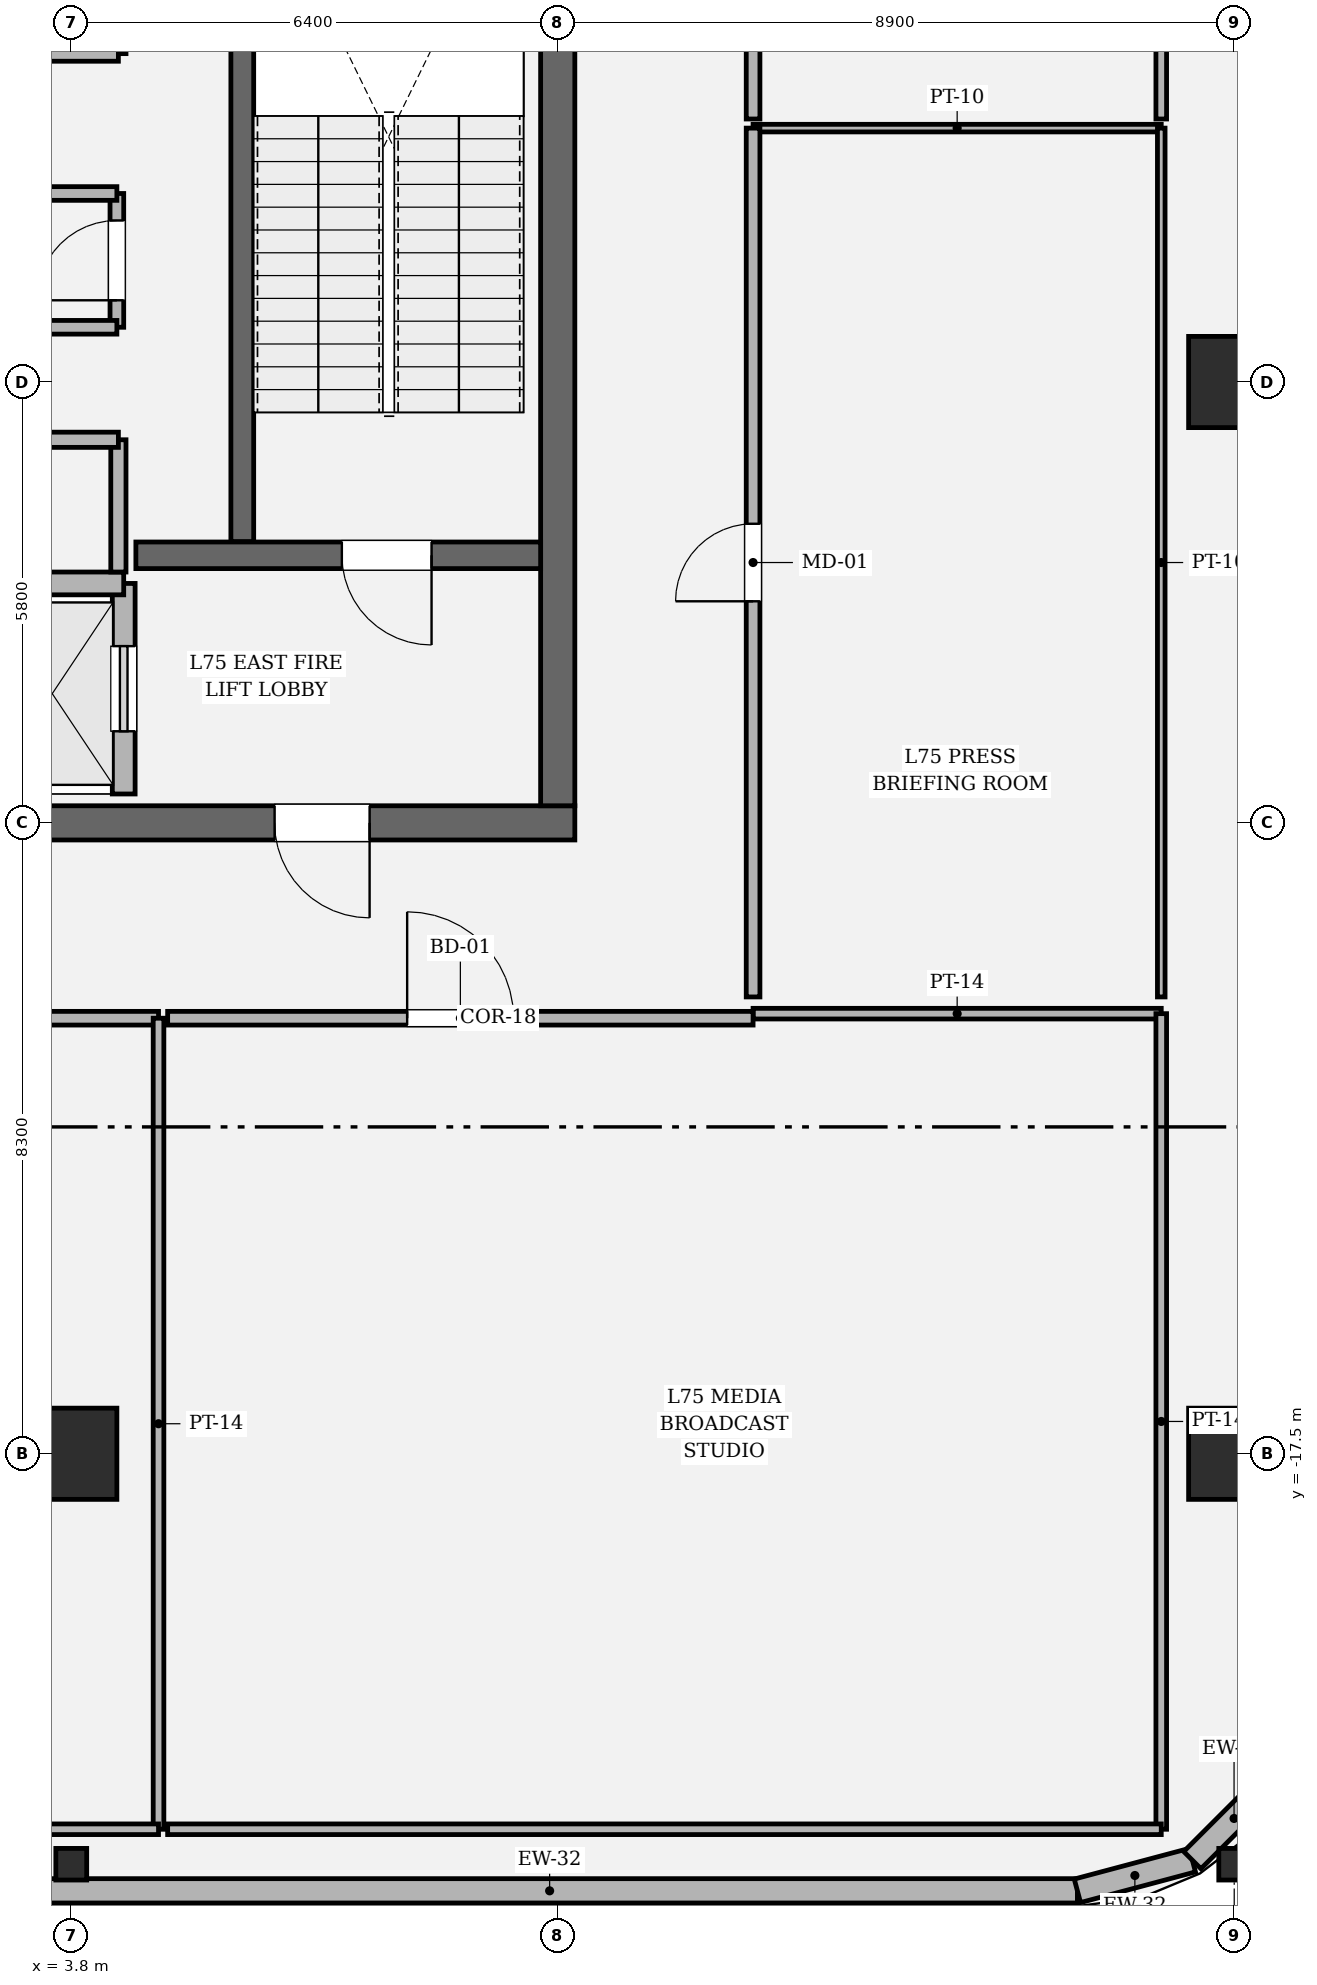
"""IFC4 building model, lengths in metres.
Left out: names, types, materials, properties, quantities, classifications, styles, units other than length and angle.
Written with IfcOpenShell. Run it as: python <this file> out.ifc"""

import sys

from ifc_helpers import new_model, si_unit, direction, frame, frame_2d, origin, origin_2d, place, context, subcontext, project, spatial, rectangle, hollow_rectangle, i_section, extrude, element, fill, save


model = new_model("IFC4")
c1 = context("Model", 3, precision=1e-05, world=origin(), true_north=direction((0.0, 1.0)))
c2 = subcontext(c1, "Body", "Model", "MODEL_VIEW")
j1 = project(units=[si_unit("LENGTHUNIT", "METRE"), si_unit("PLANEANGLEUNIT", "RADIAN")], contexts=[c1])
p1 = place(None, origin())
s1 = spatial("IfcSite", under=j1, at=p1, CompositionType="ELEMENT")
p2 = place(p1, origin())
s2 = spatial("IfcBuilding", under=s1, at=p2, CompositionType="ELEMENT")
p3 = place(p2, frame((0.0, 0.0, 317.4)))
s3 = spatial("IfcBuildingStorey", under=s2, at=p3, CompositionType="ELEMENT", Elevation=317.4)
p4 = place(p3, frame((10.425, -9.2, 0.0), z_axis=(0.0, 0.0, 1.0), x_axis=(-1.0, 0.0, 0.0)))
e1 = element("IfcWall", 1, at=p4, inside=s3, PredefinedType="SHEAR", context=c2, shape_type="SweptSolid", body=[
    extrude(rectangle(XDim=20.85, YDim=0.45, at=frame_2d((10.425, 0.0))), origin(), (0.0, 0.0, 1.0), 4.2),
])
p5 = place(p4, frame((2.7, 0.0, 0.0)))
e2 = element("IfcOpeningElement", 2, at=p5, cuts=e1, PredefinedType="OPENING", context=c2, shape_type="SweptSolid", body=[
    extrude(rectangle(XDim=1.25, YDim=2.25, at=frame_2d((0.625, 1.125))), frame((0.0, 0.235, 0.0), z_axis=(0.0, -1.0, 0.0), x_axis=(1.0, 0.0, 0.0)), (0.0, 0.0, 1.0), 0.47),
])
p6 = place(p4, frame((16.9, 0.0, 0.0)))
e3 = element("IfcOpeningElement", 3, at=p6, cuts=e1, PredefinedType="OPENING", context=c2, shape_type="SweptSolid", body=[
    extrude(rectangle(XDim=1.25, YDim=2.25, at=frame_2d((0.625, 1.125))), frame((0.0, 0.235, 0.0), z_axis=(0.0, -1.0, 0.0), x_axis=(1.0, 0.0, 0.0)), (0.0, 0.0, 1.0), 0.47),
])
p7 = place(p3, frame((10.2, 8.975, 0.0), z_axis=(0.0, 0.0, 1.0), x_axis=(0.0, -1.0, 0.0)))
e4 = element("IfcWall", 4, at=p7, inside=s3, PredefinedType="SHEAR", context=c2, shape_type="SweptSolid", body=[
    extrude(rectangle(XDim=17.95, YDim=0.45, at=frame_2d((8.975, 0.0))), origin(), (0.0, 0.0, 1.0), 4.2),
])
p8 = place(p7, frame((4.005, 0.0, 0.0)))
e5 = element("IfcOpeningElement", 5, at=p8, cuts=e4, PredefinedType="OPENING", context=c2, shape_type="SweptSolid", body=[
    extrude(rectangle(XDim=1.18, YDim=2.2, at=frame_2d((0.59, 1.1))), frame((0.0, 0.235, 0.0), z_axis=(0.0, -1.0, 0.0), x_axis=(1.0, 0.0, 0.0)), (0.0, 0.0, 1.0), 0.47),
])
p9 = place(p3, frame((6.05, 3.45, 0.0), z_axis=(0.0, 0.0, 1.0), x_axis=(0.0, -1.0, 0.0)))
e6 = element("IfcWall", 6, at=p9, inside=s3, PredefinedType="SOLIDWALL", context=c2, shape_type="SweptSolid", body=[
    extrude(rectangle(XDim=8.95, YDim=0.3, at=frame_2d((4.475, 0.0))), origin(), (0.0, 0.0, 1.0), 4.2),
])
p10 = place(p3, frame((4.65, -5.68, 0.0), z_axis=(0.0, 0.0, 1.0), x_axis=(1.0, 0.0, 0.0)))
e7 = element("IfcWall", 7, at=p10, inside=s3, PredefinedType="SOLIDWALL", context=c2, shape_type="SweptSolid", body=[
    extrude(rectangle(XDim=5.325, YDim=0.35, at=frame_2d((2.663, 0.0))), origin(), (0.0, 0.0, 1.0), 4.2),
])
p11 = place(p10, frame((2.71, 0.0, 0.0)))
e8 = element("IfcOpeningElement", 8, at=p11, cuts=e7, PredefinedType="OPENING", context=c2, shape_type="SweptSolid", body=[
    extrude(rectangle(XDim=1.18, YDim=2.2, at=frame_2d((0.59, 1.1))), frame((0.0, 0.185, 0.0), z_axis=(0.0, -1.0, 0.0), x_axis=(1.0, 0.0, 0.0)), (0.0, 0.0, 1.0), 0.37),
])
for number, where, z_axis, x_axis in (
    (9, (3.8, -17.5, 0.0), (0.0, 0.0, 1.0), (1.0, 0.0, 0.0)),
    (10, (19.1, -17.5, 0.0), (0.0, 0.0, 1.0), (1.0, 0.0, 0.0)),
    (11, (19.1, -3.4, 0.0), (0.0, 0.0, 1.0), (1.0, 0.0, 0.0)),
):
    element("IfcColumn", number, at=place(p3, frame(where, z_axis=z_axis, x_axis=x_axis)), inside=s3, PredefinedType="COLUMN", context=c2, shape_type="SweptSolid", body=[
        extrude(hollow_rectangle(XDim=1.2, YDim=1.2, WallThickness=0.035, at=origin_2d()), origin(), (0.0, 0.0, 1.0), 4.2),
    ])
for number, where, z_axis, x_axis in (
    (12, (3.8, -22.9, 0.0), (0.0, 0.0, 1.0), (1.0, 0.0, 0.0)),
    (13, (19.1, -22.9, 0.0), (0.0, 0.0, 1.0), (1.0, 0.0, 0.0)),
):
    element("IfcColumn", number, at=place(p3, frame(where, z_axis=z_axis, x_axis=x_axis)), inside=s3, PredefinedType="COLUMN", context=c2, shape_type="SweptSolid", body=[
        extrude(i_section(OverallWidth=0.406, OverallDepth=0.416, WebThickness=0.029, FlangeThickness=0.048, FilletRadius=0.018, at=origin_2d()), origin(), (0.0, 0.0, 1.0), 4.198),
    ])
p12 = place(p3, frame((3.15, -23.25, 0.0), z_axis=(0.0, 0.0, 1.0), x_axis=(1.0, 0.0, 0.0)))
e14 = element("IfcWall", 14, at=p12, inside=s3, PredefinedType="SOLIDWALL", context=c2, shape_type="SweptSolid", body=[
    extrude(rectangle(XDim=13.887, YDim=0.32, at=frame_2d((6.943, 0.0))), origin(), (0.0, 0.0, 1.0), 2.714),
])
p13 = place(p3, frame((17.037, -23.25, 0.0), z_axis=(0.0, 0.0, 1.0), x_axis=(0.966224582397, 0.257701486942, 0.0)))
e15 = element("IfcWall", 15, at=p13, inside=s3, PredefinedType="SOLIDWALL", context=c2, shape_type="SweptSolid", body=[
    extrude(rectangle(XDim=1.565, YDim=0.32, at=frame_2d((0.783, 0.0))), origin(), (0.0, 0.0, 1.0), 2.714),
])
p14 = place(p3, frame((18.549, -22.847, 0.0), z_axis=(0.0, 0.0, 1.0), x_axis=(0.707028130747, 0.707185422879, 0.0)))
e16 = element("IfcWall", 16, at=p14, inside=s3, PredefinedType="SOLIDWALL", context=c2, shape_type="SweptSolid", body=[
    extrude(rectangle(XDim=1.552, YDim=0.32, at=frame_2d((0.776, 0.0))), origin(), (0.0, 0.0, 1.0), 2.674),
])
p15 = place(p3, frame((4.49, -8.82, 0.0), z_axis=(0.0, 0.0, 1.0), x_axis=(0.0, 1.0, 0.0)))
e17 = element("IfcWall", 17, at=p15, inside=s3, PredefinedType="SOLIDWALL", context=c2, shape_type="SweptSolid", body=[
    extrude(rectangle(XDim=2.77, YDim=0.3, at=frame_2d((1.385, 0.0))), origin(), (0.0, 0.0, 1.0), 4.0),
])
p16 = place(p15, frame((0.825, 0.0, 0.0)))
e18 = element("IfcOpeningElement", 18, at=p16, cuts=e17, PredefinedType="OPENING", context=c2, shape_type="SweptSolid", body=[
    extrude(rectangle(XDim=1.12, YDim=2.25, at=frame_2d((0.56, 1.125))), frame((0.0, 0.16, 0.0), z_axis=(0.0, -1.0, 0.0), x_axis=(1.0, 0.0, 0.0)), (0.0, 0.0, 1.0), 0.32),
])
p17 = place(p3, frame((2.61, -6.05, 0.0), z_axis=(0.0, 0.0, 1.0), x_axis=(1.0, 0.0, 0.0)))
e19 = element("IfcWall", 19, at=p17, inside=s3, PredefinedType="SOLIDWALL", context=c2, shape_type="SweptSolid", body=[
    extrude(rectangle(XDim=1.88, YDim=0.3, at=frame_2d((0.94, 0.0))), origin(), (0.0, 0.0, 1.0), 4.0),
])
p18 = place(p3, frame((4.42, -5.9, 0.0), z_axis=(0.0, 0.0, 1.0), x_axis=(0.0, 1.0, 0.0)))
e20 = element("IfcWall", 20, at=p18, inside=s3, PredefinedType="SOLIDWALL", context=c2, shape_type="SweptSolid", body=[
    extrude(rectangle(XDim=1.74, YDim=0.2, at=frame_2d((0.87, 0.0))), origin(), (0.0, 0.0, 1.0), 4.0),
])
p19 = place(p3, frame((4.42, -4.16, 0.0), z_axis=(0.0, 0.0, 1.0), x_axis=(-1.0, 0.0, 0.0)))
e21 = element("IfcWall", 21, at=p19, inside=s3, PredefinedType="SOLIDWALL", context=c2, shape_type="SweptSolid", body=[
    extrude(rectangle(XDim=2.84, YDim=0.2, at=frame_2d((1.42, 0.0))), origin(), (0.0, 0.0, 1.0), 4.0),
])
p20 = place(p19, frame((0.945, 0.0, 0.0)))
e22 = element("IfcOpeningElement", 22, at=p20, cuts=e21, PredefinedType="OPENING", context=c2, shape_type="SweptSolid", body=[
    extrude(rectangle(XDim=0.95, YDim=2.15, at=frame_2d((0.475, 1.075))), frame((0.0, 0.11, 0.0), z_axis=(0.0, -1.0, 0.0), x_axis=(1.0, 0.0, 0.0)), (0.0, 0.0, 1.0), 0.22),
])
p21 = place(p3, frame((4.4, -2.68, 0.0), z_axis=(0.0, 0.0, 1.0), x_axis=(0.0, 1.0, 0.0)))
e23 = element("IfcWall", 23, at=p21, inside=s3, PredefinedType="PARTITIONING", context=c2, shape_type="SweptSolid", body=[
    extrude(rectangle(XDim=1.76, YDim=0.18, at=frame_2d((0.88, 0.0))), origin(), (0.0, 0.0, 1.0), 4.0),
])
p22 = place(p21, frame((0.355, 0.0, 0.0)))
e24 = element("IfcOpeningElement", 24, at=p22, cuts=e23, PredefinedType="OPENING", context=c2, shape_type="SweptSolid", body=[
    extrude(rectangle(XDim=1.05, YDim=2.2, at=frame_2d((0.525, 1.1))), frame((0.0, 0.1, 0.0), z_axis=(0.0, -1.0, 0.0), x_axis=(1.0, 0.0, 0.0)), (0.0, 0.0, 1.0), 0.2),
])
for number, where, z_axis, x_axis in (
    (25, (4.4, -0.92, 0.0), (0.0, 0.0, 1.0), (-1.0, 0.0, 0.0)),
    (26, (0.25, -2.68, 0.0), (0.0, 0.0, 1.0), (1.0, 0.0, 0.0)),
):
    element("IfcWall", number, at=place(p3, frame(where, z_axis=z_axis, x_axis=x_axis)), inside=s3, PredefinedType="PARTITIONING", context=c2, shape_type="SweptSolid", body=[
        extrude(rectangle(XDim=4.15, YDim=0.18, at=frame_2d((2.075, 0.0))), origin(), (0.0, 0.0, 1.0), 4.0),
    ])
p23 = place(p3, frame((4.42, 0.92, 0.0), z_axis=(0.0, 0.0, 1.0), x_axis=(0.0, 1.0, 0.0)))
e27 = element("IfcWall", 27, at=p23, inside=s3, PredefinedType="SOLIDWALL", context=c2, shape_type="SweptSolid", body=[
    extrude(rectangle(XDim=1.76, YDim=0.2, at=frame_2d((0.88, 0.0))), origin(), (0.0, 0.0, 1.0), 4.0),
])
p24 = place(p23, frame((0.355, 0.0, 0.0)))
e28 = element("IfcOpeningElement", 28, at=p24, cuts=e27, PredefinedType="OPENING", context=c2, shape_type="SweptSolid", body=[
    extrude(rectangle(XDim=1.05, YDim=2.2, at=frame_2d((0.525, 1.1))), frame((0.0, 0.11, 0.0), z_axis=(0.0, -1.0, 0.0), x_axis=(1.0, 0.0, 0.0)), (0.0, 0.0, 1.0), 0.22),
])
p25 = place(p3, frame((2.5, 0.92, 0.0), z_axis=(0.0, 0.0, 1.0), x_axis=(1.0, 0.0, 0.0)))
e29 = element("IfcWall", 29, at=p25, inside=s3, PredefinedType="SOLIDWALL", context=c2, shape_type="SweptSolid", body=[
    extrude(rectangle(XDim=1.92, YDim=0.2, at=frame_2d((0.96, 0.0))), origin(), (0.0, 0.0, 1.0), 4.0),
])
p26 = place(p3, frame((-12.77, -11.77, 0.0), z_axis=(0.0, 0.0, 1.0), x_axis=(1.0, 0.0, 0.0)))
e30 = element("IfcWall", 30, at=p26, inside=s3, PredefinedType="PARTITIONING", context=c2, shape_type="SweptSolid", body=[
    extrude(rectangle(XDim=17.718, YDim=0.18, at=frame_2d((8.859, 0.0))), origin(), (0.0, 0.0, 1.0), 3.394),
])
p27 = place(p26, frame((8.334, 0.0, 0.0)))
e31 = element("IfcOpeningElement", 31, at=p27, cuts=e30, PredefinedType="OPENING", context=c2, shape_type="SweptSolid", body=[
    extrude(rectangle(XDim=1.05, YDim=2.2, at=frame_2d((0.525, 1.1))), frame((0.0, 0.1, 0.0), z_axis=(0.0, -1.0, 0.0), x_axis=(1.0, 0.0, 0.0)), (0.0, 0.0, 1.0), 0.2),
])
p28 = place(p3, frame((4.948, -11.77, 0.0), z_axis=(0.0, 0.0, 1.0), x_axis=(0.0, -1.0, 0.0)))
e32 = element("IfcWall", 32, at=p28, inside=s3, PredefinedType="PARTITIONING", context=c2, shape_type="SweptSolid", body=[
    extrude(rectangle(XDim=10.67, YDim=0.14, at=frame_2d((5.335, 0.0))), origin(), (0.0, 0.0, 1.0), 3.394),
])
p29 = place(p3, frame((4.948, -22.44, 0.0), z_axis=(0.0, 0.0, 1.0), x_axis=(-1.0, 0.0, 0.0)))
e33 = element("IfcWall", 33, at=p29, inside=s3, PredefinedType="PARTITIONING", context=c2, shape_type="SweptSolid", body=[
    extrude(rectangle(XDim=28.696, YDim=0.14, at=frame_2d((14.348, 0.0))), origin(), (0.0, 0.0, 1.0), 2.674),
])
p30 = place(p3, frame((12.77, -11.71, 0.0), z_axis=(0.0, 0.0, 1.0), x_axis=(1.0, 0.0, 0.0)))
e34 = element("IfcWall", 34, at=p30, inside=s3, PredefinedType="PARTITIONING", context=c2, shape_type="SweptSolid", body=[
    extrude(rectangle(XDim=5.37, YDim=0.14, at=frame_2d((2.685, 0.0))), origin(), (0.0, 0.0, 1.0), 3.634),
])
p31 = place(p3, frame((18.14, -11.71, 0.0), z_axis=(0.0, 0.0, 1.0), x_axis=(0.0, -1.0, 0.0)))
e35 = element("IfcWall", 35, at=p31, inside=s3, PredefinedType="PARTITIONING", context=c2, shape_type="SweptSolid", body=[
    extrude(rectangle(XDim=10.73, YDim=0.14, at=frame_2d((5.365, 0.0))), origin(), (0.0, 0.0, 1.0), 3.394),
])
p32 = place(p3, frame((18.14, -22.44, 0.0), z_axis=(0.0, 0.0, 1.0), x_axis=(-1.0, 0.0, 0.0)))
e36 = element("IfcWall", 36, at=p32, inside=s3, PredefinedType="PARTITIONING", context=c2, shape_type="SweptSolid", body=[
    extrude(rectangle(XDim=13.072, YDim=0.14, at=frame_2d((6.536, 0.0))), origin(), (0.0, 0.0, 1.0), 4.0),
])
p33 = place(p3, frame((5.068, -11.77, 0.0), z_axis=(0.0, 0.0, 1.0), x_axis=(1.0, 0.0, 0.0)))
e37 = element("IfcWall", 37, at=p33, inside=s3, PredefinedType="PARTITIONING", context=c2, shape_type="SweptSolid", body=[
    extrude(rectangle(XDim=7.702, YDim=0.18, at=frame_2d((3.851, 0.0))), origin(), (0.0, 0.0, 1.0), 3.394),
])
p34 = place(p33, frame((3.151, 0.0, 0.0)))
e38 = element("IfcOpeningElement", 38, at=p34, cuts=e37, PredefinedType="OPENING", context=c2, shape_type="SweptSolid", body=[
    extrude(rectangle(XDim=1.4, YDim=2.25, at=frame_2d((0.7, 1.125))), frame((0.0, 0.1, 0.0), z_axis=(0.0, -1.0, 0.0), x_axis=(1.0, 0.0, 0.0)), (0.0, 0.0, 1.0), 0.2),
])
p35 = place(p3, frame((12.77, -0.06, 0.0), z_axis=(0.0, 0.0, 1.0), x_axis=(1.0, 0.0, 0.0)))
e39 = element("IfcWall", 39, at=p35, inside=s3, PredefinedType="PARTITIONING", context=c2, shape_type="SweptSolid", body=[
    extrude(rectangle(XDim=5.37, YDim=0.1, at=frame_2d((2.685, 0.0))), origin(), (0.0, 0.0, 1.0), 4.0),
])
p36 = place(p3, frame((18.14, -0.06, 0.0), z_axis=(0.0, 0.0, 1.0), x_axis=(0.0, -1.0, 0.0)))
e40 = element("IfcWall", 40, at=p36, inside=s3, PredefinedType="PARTITIONING", context=c2, shape_type="SweptSolid", body=[
    extrude(rectangle(XDim=11.43, YDim=0.1, at=frame_2d((5.715, 0.0))), origin(), (0.0, 0.0, 1.0), 3.394),
])
p37 = place(p3, frame((12.77, -11.49, 0.0), z_axis=(0.0, 0.0, 1.0), x_axis=(0.0, 1.0, 0.0)))
e41 = element("IfcWall", 41, at=p37, inside=s3, PredefinedType="PARTITIONING", context=c2, shape_type="SweptSolid", body=[
    extrude(rectangle(XDim=11.43, YDim=0.18, at=frame_2d((5.715, 0.0))), origin(), (0.0, 0.0, 1.0), 3.394),
])
p38 = place(p37, frame((5.205, 0.0, 0.0)))
e42 = element("IfcOpeningElement", 42, at=p38, cuts=e41, PredefinedType="OPENING", context=c2, shape_type="SweptSolid", body=[
    extrude(rectangle(XDim=1.02, YDim=2.2, at=frame_2d((0.51, 1.1))), frame((0.0, 0.1, 0.0), z_axis=(0.0, -1.0, 0.0), x_axis=(1.0, 0.0, 0.0)), (0.0, 0.0, 1.0), 0.2),
])
p39 = place(p3, frame((18.14, 11.49, 0.0), z_axis=(0.0, 0.0, 1.0), x_axis=(0.0, -1.0, 0.0)))
e43 = element("IfcWall", 43, at=p39, inside=s3, PredefinedType="PARTITIONING", context=c2, shape_type="SweptSolid", body=[
    extrude(rectangle(XDim=11.43, YDim=0.14, at=frame_2d((5.715, 0.0))), origin(), (0.0, 0.0, 1.0), 3.394),
])
p40 = place(p3, frame((12.77, 0.06, 0.0), z_axis=(0.0, 0.0, 1.0), x_axis=(0.0, 1.0, 0.0)))
e44 = element("IfcWall", 44, at=p40, inside=s3, PredefinedType="PARTITIONING", context=c2, shape_type="SweptSolid", body=[
    extrude(rectangle(XDim=11.43, YDim=0.18, at=frame_2d((5.715, 0.0))), origin(), (0.0, 0.0, 1.0), 3.394),
])
p41 = place(p40, frame((5.19, 0.0, 0.0)))
e45 = element("IfcOpeningElement", 45, at=p41, cuts=e44, PredefinedType="OPENING", context=c2, shape_type="SweptSolid", body=[
    extrude(rectangle(XDim=1.05, YDim=2.2, at=frame_2d((0.525, 1.1))), frame((0.0, 0.1, 0.0), z_axis=(0.0, -1.0, 0.0), x_axis=(1.0, 0.0, 0.0)), (0.0, 0.0, 1.0), 0.2),
])
p42 = place(p11, origin())
e46 = element("IfcDoor", 46, at=p42, inside=s3, OperationType="SINGLE_SWING_RIGHT", PredefinedType="DOOR", context=c2, shape_type="SweptSolid", body=[
    extrude(rectangle(XDim=1.18, YDim=2.2, at=frame_2d((0.59, 1.1))), frame((0.0, 0.025, 0.0), z_axis=(0.0, -1.0, 0.0), x_axis=(1.0, 0.0, 0.0)), (0.0, 0.0, 1.0), 0.05),
])
fill(e8, e46)
p43 = place(p5, origin())
e47 = element("IfcDoor", 47, at=p43, inside=s3, OperationType="SINGLE_SWING_LEFT", PredefinedType="DOOR", context=c2, shape_type="SweptSolid", body=[
    extrude(rectangle(XDim=1.25, YDim=2.25, at=frame_2d((0.625, 1.125))), frame((0.0, 0.025, 0.0), z_axis=(0.0, -1.0, 0.0), x_axis=(1.0, 0.0, 0.0)), (0.0, 0.0, 1.0), 0.05),
])
fill(e2, e47)
p44 = place(p16, origin())
e48 = element("IfcDoor", 48, at=p44, inside=s3, OperationType="SLIDING_TO_RIGHT", PredefinedType="DOOR", context=c2, shape_type="SweptSolid", body=[
    extrude(rectangle(XDim=1.12, YDim=2.25, at=frame_2d((0.56, 1.125))), frame((0.0, 0.025, 0.0), z_axis=(0.0, -1.0, 0.0), x_axis=(1.0, 0.0, 0.0)), (0.0, 0.0, 1.0), 0.05),
])
fill(e18, e48)
p45 = place(p22, origin())
e49 = element("IfcDoor", 49, at=p45, inside=s3, OperationType="SINGLE_SWING_LEFT", PredefinedType="DOOR", context=c2, shape_type="SweptSolid", body=[
    extrude(rectangle(XDim=1.05, YDim=2.2, at=frame_2d((0.525, 1.1))), frame((0.0, 0.025, 0.0), z_axis=(0.0, -1.0, 0.0), x_axis=(1.0, 0.0, 0.0)), (0.0, 0.0, 1.0), 0.05),
])
fill(e24, e49)
p46 = place(p34, origin())
e50 = element("IfcDoor", 50, at=p46, inside=s3, OperationType="SINGLE_SWING_LEFT", PredefinedType="DOOR", context=c2, shape_type="SweptSolid", body=[
    extrude(rectangle(XDim=1.4, YDim=2.25, at=frame_2d((0.7, 1.125))), frame((0.0, 0.025, 0.0), z_axis=(0.0, -1.0, 0.0), x_axis=(1.0, 0.0, 0.0)), (0.0, 0.0, 1.0), 0.05),
])
fill(e38, e50)
p47 = place(p38, origin())
e51 = element("IfcDoor", 51, at=p47, inside=s3, OperationType="SINGLE_SWING_LEFT", PredefinedType="DOOR", context=c2, shape_type="SweptSolid", body=[
    extrude(rectangle(XDim=1.02, YDim=2.2, at=frame_2d((0.51, 1.1))), frame((0.0, 0.025, 0.0), z_axis=(0.0, -1.0, 0.0), x_axis=(1.0, 0.0, 0.0)), (0.0, 0.0, 1.0), 0.05),
])
fill(e42, e51)
save(model, sys.argv[1])
